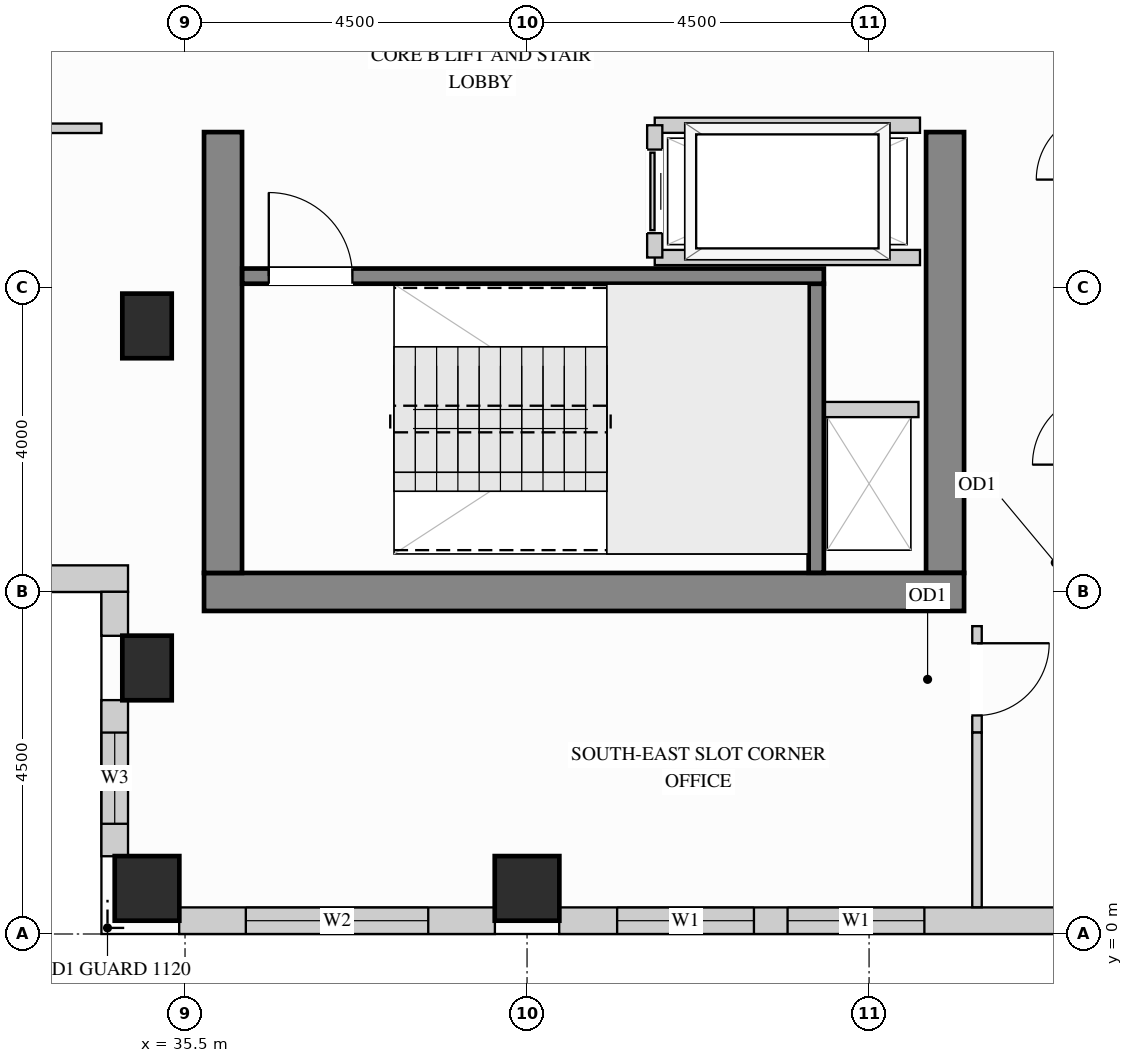
"""IFC4 building model, lengths in metres.
Left out: names, types, materials, properties, quantities, classifications, styles, units other than length and angle.
Written with IfcOpenShell. Run it as: python <this file> out.ifc"""

import sys

from ifc_helpers import new_model, si_unit, direction, frame, frame_2d, origin, origin_2d, place, context, subcontext, project, spatial, rectangle, extrude, source, transform, mapped, element, fill, save


model = new_model("IFC4")
c1 = context("Model", 3, precision=1e-05, world=origin(), true_north=direction((0.0, 1.0)))
c2 = subcontext(c1, "Body", "Model", "MODEL_VIEW")
j1 = project(units=[si_unit("LENGTHUNIT", "METRE"), si_unit("PLANEANGLEUNIT", "RADIAN")], contexts=[c1])
p1 = place(None, origin())
s1 = spatial("IfcSite", under=j1, at=p1, CompositionType="ELEMENT")
p2 = place(p1, origin())
s2 = spatial("IfcBuilding", under=s1, at=p2, CompositionType="ELEMENT")
p3 = place(p2, frame((0.0, 0.0, 216.0)))
s3 = spatial("IfcBuildingStorey", under=s2, at=p3, CompositionType="ELEMENT", Elevation=216.0)
m1 = source(origin(), c2, "Body", "SweptSolid", [
    extrude(rectangle(XDim=0.65, YDim=0.85, at=origin_2d()), origin(), (0.0, 0.0, 1.0), 3.4),
])
for number, where, z_axis, x_axis in (
    (1, (35.0, 3.5, 0.0), (0.0, 0.0, 1.0), (1.0, 0.0, 0.0)),
    (2, (35.0, 8.0, 0.0), (0.0, 0.0, 1.0), (1.0, 0.0, 0.0)),
):
    element("IfcColumn", number, at=place(p3, frame(where, z_axis=z_axis, x_axis=x_axis)), inside=s3, PredefinedType="COLUMN", context=c2, shape_type="MappedRepresentation", body=[
        mapped(m1, transform((0.0, 0.0, 0.0), x_axis=(1.0, 0.0, 0.0), y_axis=(0.0, 1.0, 0.0), z_axis=(0.0, 0.0, 1.0))),
    ])
m2 = source(origin(), c2, "Body", "SweptSolid", [
    extrude(rectangle(XDim=0.85, YDim=0.85, at=origin_2d()), origin(), (0.0, 0.0, 1.0), 3.4),
])
for number, where, z_axis, x_axis in (
    (3, (35.0, 0.6, 0.0), (0.0, 0.0, 1.0), (1.0, 0.0, 0.0)),
    (4, (40.0, 0.6, 0.0), (0.0, 0.0, 1.0), (1.0, 0.0, 0.0)),
):
    element("IfcColumn", number, at=place(p3, frame(where, z_axis=z_axis, x_axis=x_axis)), inside=s3, PredefinedType="COLUMN", context=c2, shape_type="MappedRepresentation", body=[
        mapped(m2, transform((0.0, 0.0, 0.0), x_axis=(1.0, 0.0, 0.0), y_axis=(0.0, 1.0, 0.0), z_axis=(0.0, 0.0, 1.0))),
    ])
m3 = source(origin(), c2, "Body", "SweptSolid", [
    extrude(rectangle(XDim=5.8, YDim=0.5, at=frame_2d((2.9, 0.0))), origin(), (0.0, 0.0, 1.0), 3.4),
])
p4 = place(p3, frame((45.5, 4.75, 0.0), z_axis=(0.0, 0.0, 1.0), x_axis=(0.0, 1.0, 0.0)))
e5 = element("IfcWall", 5, at=p4, inside=s3, PredefinedType="SHEAR", context=c2, shape_type="MappedRepresentation", body=[
    mapped(m3, transform((0.0, 0.0, 0.0), x_axis=(1.0, 0.0, 0.0), y_axis=(0.0, 1.0, 0.0), z_axis=(0.0, 0.0, 1.0))),
])
m4 = source(origin(), c2, "Body", "SweptSolid", [
    extrude(rectangle(XDim=10.0, YDim=0.5, at=frame_2d((5.0, 0.0))), origin(), (0.0, 0.0, 1.0), 3.4),
])
p5 = place(p3, frame((35.75, 4.5, 0.0), z_axis=(0.0, 0.0, 1.0), x_axis=(1.0, 0.0, 0.0)))
e6 = element("IfcWall", 6, at=p5, inside=s3, PredefinedType="SHEAR", context=c2, shape_type="MappedRepresentation", body=[
    mapped(m4, transform((0.0, 0.0, 0.0), x_axis=(1.0, 0.0, 0.0), y_axis=(0.0, 1.0, 0.0), z_axis=(0.0, 0.0, 1.0))),
])
p6 = place(p3, frame((36.0, 4.75, 0.0), z_axis=(0.0, 0.0, 1.0), x_axis=(0.0, 1.0, 0.0)))
e7 = element("IfcWall", 7, at=p6, inside=s3, PredefinedType="SHEAR", context=c2, shape_type="MappedRepresentation", body=[
    mapped(m3, transform((0.0, 0.0, 0.0), x_axis=(1.0, 0.0, 0.0), y_axis=(0.0, 1.0, 0.0), z_axis=(0.0, 0.0, 1.0))),
])
p7 = place(p3, frame((19.15, 4.675, 0.0), z_axis=(0.0, 0.0, 1.0), x_axis=(1.0, 0.0, 0.0)))
e8 = element("IfcWall", 8, at=p7, inside=s3, PredefinedType="SOLIDWALL", context=c2, shape_type="SweptSolid", body=[
    extrude(rectangle(XDim=15.6, YDim=0.35, at=frame_2d((7.8, 0.0))), origin(), (0.0, 0.0, 1.0), 3.385),
])
p8 = place(p7, frame((1.73, 0.0, 0.78)))
e9 = element("IfcOpeningElement", 9, at=p8, cuts=e8, PredefinedType="OPENING", context=c2, shape_type="SweptSolid", body=[
    extrude(rectangle(XDim=1.5, YDim=2.0, at=frame_2d((0.75, 1.0))), frame((0.0, 0.185, 0.0), z_axis=(0.0, -1.0, 0.0), x_axis=(1.0, 0.0, 0.0)), (0.0, 0.0, 1.0), 0.37),
])
p9 = place(p7, frame((4.64, 0.0, 0.78)))
e10 = element("IfcOpeningElement", 10, at=p9, cuts=e8, PredefinedType="OPENING", context=c2, shape_type="SweptSolid", body=[
    extrude(rectangle(XDim=1.5, YDim=2.0, at=frame_2d((0.75, 1.0))), frame((0.0, 0.185, 0.0), z_axis=(0.0, -1.0, 0.0), x_axis=(1.0, 0.0, 0.0)), (0.0, 0.0, 1.0), 0.37),
])
p10 = place(p7, frame((9.46, 0.0, 0.78)))
e11 = element("IfcOpeningElement", 11, at=p10, cuts=e8, PredefinedType="OPENING", context=c2, shape_type="SweptSolid", body=[
    extrude(rectangle(XDim=1.5, YDim=2.0, at=frame_2d((0.75, 1.0))), frame((0.0, 0.185, 0.0), z_axis=(0.0, -1.0, 0.0), x_axis=(1.0, 0.0, 0.0)), (0.0, 0.0, 1.0), 0.37),
])
p11 = place(p7, frame((12.37, 0.0, 0.78)))
e12 = element("IfcOpeningElement", 12, at=p11, cuts=e8, PredefinedType="OPENING", context=c2, shape_type="SweptSolid", body=[
    extrude(rectangle(XDim=1.5, YDim=2.0, at=frame_2d((0.75, 1.0))), frame((0.0, 0.185, 0.0), z_axis=(0.0, -1.0, 0.0), x_axis=(1.0, 0.0, 0.0)), (0.0, 0.0, 1.0), 0.37),
])
m5 = source(origin(), c2, "Body", "SweptSolid", [
    extrude(rectangle(XDim=0.579, YDim=0.35, at=frame_2d((0.29, 0.0))), origin(), (0.0, 0.0, 1.0), 3.385),
])
p12 = place(p3, frame((34.575, 4.502, 0.0), z_axis=(0.0, 0.0, 1.0), x_axis=(0.0, -1.0, 0.0)))
e13 = element("IfcWall", 13, at=p12, inside=s3, PredefinedType="SOLIDWALL", context=c2, shape_type="MappedRepresentation", body=[
    mapped(m5, transform((0.0, 0.0, 0.0), x_axis=(1.0, 0.0, 0.0), y_axis=(0.0, 1.0, 0.0), z_axis=(0.0, 0.0, 1.0))),
])
p13 = place(p3, frame((34.575, 3.077, 0.0), z_axis=(0.0, 0.0, 1.0), x_axis=(0.0, -1.0, 0.0)))
e14 = element("IfcWall", 14, at=p13, inside=s3, PredefinedType="SOLIDWALL", context=c2, shape_type="SweptSolid", body=[
    extrude(rectangle(XDim=2.054, YDim=0.35, at=frame_2d((1.027, 0.0))), origin(), (0.0, 0.0, 1.0), 3.385),
])
p14 = place(p13, frame((0.427, 0.0, 0.78)))
e15 = element("IfcOpeningElement", 15, at=p14, cuts=e14, PredefinedType="OPENING", context=c2, shape_type="SweptSolid", body=[
    extrude(rectangle(XDim=1.2, YDim=2.0, at=frame_2d((0.6, 1.0))), frame((0.0, 0.185, 0.0), z_axis=(0.0, -1.0, 0.0), x_axis=(1.0, 0.0, 0.0)), (0.0, 0.0, 1.0), 0.37),
])
p15 = place(p3, frame((35.423, 0.175, 0.0), z_axis=(0.0, 0.0, 1.0), x_axis=(1.0, 0.0, 0.0)))
e16 = element("IfcWall", 16, at=p15, inside=s3, PredefinedType="SOLIDWALL", context=c2, shape_type="SweptSolid", body=[
    extrude(rectangle(XDim=4.154, YDim=0.35, at=frame_2d((2.077, 0.0))), origin(), (0.0, 0.0, 1.0), 3.385),
])
p16 = place(p15, frame((0.877, 0.0, 0.78)))
e17 = element("IfcOpeningElement", 17, at=p16, cuts=e16, PredefinedType="OPENING", context=c2, shape_type="SweptSolid", body=[
    extrude(rectangle(XDim=2.4, YDim=2.1, at=frame_2d((1.2, 1.05))), frame((0.0, 0.185, 0.0), z_axis=(0.0, -1.0, 0.0), x_axis=(1.0, 0.0, 0.0)), (0.0, 0.0, 1.0), 0.37),
])
p17 = place(p3, frame((40.423, 0.175, 0.0), z_axis=(0.0, 0.0, 1.0), x_axis=(1.0, 0.0, 0.0)))
e18 = element("IfcWall", 18, at=p17, inside=s3, PredefinedType="SOLIDWALL", context=c2, shape_type="SweptSolid", body=[
    extrude(rectangle(XDim=7.077, YDim=0.35, at=frame_2d((3.539, 0.0))), origin(), (0.0, 0.0, 1.0), 3.385),
])
p18 = place(p17, frame((0.762, 0.0, 0.78)))
e19 = element("IfcOpeningElement", 19, at=p18, cuts=e18, PredefinedType="OPENING", context=c2, shape_type="SweptSolid", body=[
    extrude(rectangle(XDim=1.8, YDim=2.1, at=frame_2d((0.9, 1.05))), frame((0.0, 0.185, 0.0), z_axis=(0.0, -1.0, 0.0), x_axis=(1.0, 0.0, 0.0)), (0.0, 0.0, 1.0), 0.37),
])
p19 = place(p17, frame((3.005, 0.0, 0.78)))
e20 = element("IfcOpeningElement", 20, at=p19, cuts=e18, PredefinedType="OPENING", context=c2, shape_type="SweptSolid", body=[
    extrude(rectangle(XDim=1.8, YDim=2.1, at=frame_2d((0.9, 1.05))), frame((0.0, 0.185, 0.0), z_axis=(0.0, -1.0, 0.0), x_axis=(1.0, 0.0, 0.0)), (0.0, 0.0, 1.0), 0.37),
])
p20 = place(p3, frame((45.92, 2.65, 0.0), z_axis=(0.0, 0.0, 1.0), x_axis=(0.0, 1.0, 0.0)))
e21 = element("IfcWall", 21, at=p20, inside=s3, PredefinedType="PARTITIONING", context=c2, shape_type="SweptSolid", body=[
    extrude(rectangle(XDim=1.4, YDim=0.125, at=frame_2d((0.7, 0.0))), origin(), (0.0, 0.0, 1.0), 3.385),
])
p21 = place(p20, frame((0.225, 0.0, 0.0)))
e22 = element("IfcOpeningElement", 22, at=p21, cuts=e21, PredefinedType="OPENING", context=c2, shape_type="SweptSolid", body=[
    extrude(rectangle(XDim=0.95, YDim=2.15, at=frame_2d((0.475, 1.075))), frame((0.0, 0.073, 0.0), z_axis=(0.0, -1.0, 0.0), x_axis=(1.0, 0.0, 0.0)), (0.0, 0.0, 1.0), 0.145),
])
m6 = source(origin(), c2, "Body", "SweptSolid", [
    extrude(rectangle(XDim=2.298, YDim=0.125, at=frame_2d((1.149, 0.0))), origin(), (0.0, 0.0, 1.0), 3.385),
])
p22 = place(p3, frame((45.92, 0.352, 0.0), z_axis=(0.0, 0.0, 1.0), x_axis=(0.0, 1.0, 0.0)))
e23 = element("IfcWall", 23, at=p22, inside=s3, PredefinedType="PARTITIONING", context=c2, shape_type="MappedRepresentation", body=[
    mapped(m6, transform((0.0, 0.0, 0.0), x_axis=(1.0, 0.0, 0.0), y_axis=(0.0, 1.0, 0.0), z_axis=(0.0, 0.0, 1.0))),
])
p23 = place(p3, frame((26.95, 10.6, 0.0), z_axis=(0.0, 0.0, 1.0), x_axis=(1.0, 0.0, 0.0)))
e24 = element("IfcWall", 24, at=p23, inside=s3, PredefinedType="PARTITIONING", context=c2, shape_type="SweptSolid", body=[
    extrude(rectangle(XDim=7.45, YDim=0.125, at=frame_2d((3.725, 0.0))), origin(), (0.0, 0.0, 1.0), 3.385),
])
p24 = place(p23, frame((4.478, 0.0, 0.0)))
e25 = element("IfcOpeningElement", 25, at=p24, cuts=e24, PredefinedType="OPENING", context=c2, shape_type="SweptSolid", body=[
    extrude(rectangle(XDim=0.95, YDim=2.15, at=frame_2d((0.475, 1.075))), frame((0.0, 0.073, 0.0), z_axis=(0.0, -1.0, 0.0), x_axis=(1.0, 0.0, 0.0)), (0.0, 0.0, 1.0), 0.145),
])
m7 = source(origin(), c2, "Body", "SweptSolid", [
    extrude(rectangle(XDim=1.3, YDim=0.2, at=frame_2d((0.65, 0.0))), origin(), (0.0, 0.0, 1.0), 3.385),
])
p25 = place(p3, frame((43.85, 6.9, 0.0), z_axis=(0.0, 0.0, 1.0), x_axis=(1.0, 0.0, 0.0)))
e26 = element("IfcWall", 26, at=p25, inside=s3, PredefinedType="PARTITIONING", context=c2, shape_type="MappedRepresentation", body=[
    mapped(m7, transform((0.0, 0.0, 0.0), x_axis=(1.0, 0.0, 0.0), y_axis=(0.0, 1.0, 0.0), z_axis=(0.0, 0.0, 1.0))),
])
m8 = source(origin(), c2, "Body", "SweptSolid", [
    extrude(rectangle(XDim=3.49, YDim=0.2, at=frame_2d((1.745, 0.0))), origin(), (0.0, 0.0, 1.0), 3.385),
])
for number, where, z_axis, x_axis in (
    (27, (41.68, 10.64, 0.0), (0.0, 0.0, 1.0), (1.0, 0.0, 0.0)),
    (28, (41.68, 8.9, 0.0), (0.0, 0.0, 1.0), (1.0, 0.0, 0.0)),
):
    element("IfcWall", number, at=place(p3, frame(where, z_axis=z_axis, x_axis=x_axis)), inside=s3, PredefinedType="PARTITIONING", context=c2, shape_type="MappedRepresentation", body=[
        mapped(m8, transform((0.0, 0.0, 0.0), x_axis=(1.0, 0.0, 0.0), y_axis=(0.0, 1.0, 0.0), z_axis=(0.0, 0.0, 1.0))),
    ])
p26 = place(p3, frame((41.68, 8.9, 0.0), z_axis=(0.0, 0.0, 1.0), x_axis=(0.0, 1.0, 0.0)))
e29 = element("IfcWall", 29, at=p26, inside=s3, PredefinedType="PARTITIONING", context=c2, shape_type="SweptSolid", body=[
    extrude(rectangle(XDim=1.74, YDim=0.2, at=frame_2d((0.87, 0.0))), origin(), (0.0, 0.0, 1.0), 3.385),
])
p27 = place(p26, frame((0.32, 0.0, 0.0)))
e30 = element("IfcOpeningElement", 30, at=p27, cuts=e29, PredefinedType="OPENING", context=c2, shape_type="SweptSolid", body=[
    extrude(rectangle(XDim=1.1, YDim=2.2, at=frame_2d((0.55, 1.1))), frame((0.0, 0.11, 0.0), z_axis=(0.0, -1.0, 0.0), x_axis=(1.0, 0.0, 0.0)), (0.0, 0.0, 1.0), 0.22),
])
m9 = source(origin(), c2, "Body", "SweptSolid", [
    extrude(rectangle(XDim=3.803, YDim=0.2, at=frame_2d((1.901, 0.0))), origin(), (0.0, 0.0, 1.0), 3.4),
])
p28 = place(p3, frame((43.805, 4.752, 0.0), z_axis=(0.0, 0.0, 1.0), x_axis=(0.0, 1.0, 0.0)))
e31 = element("IfcWall", 31, at=p28, inside=s3, PredefinedType="SHEAR", context=c2, shape_type="MappedRepresentation", body=[
    mapped(m9, transform((0.0, 0.0, 0.0), x_axis=(1.0, 0.0, 0.0), y_axis=(0.0, 1.0, 0.0), z_axis=(0.0, 0.0, 1.0))),
])
p29 = place(p3, frame((36.252, 8.655, 0.0), z_axis=(0.0, 0.0, 1.0), x_axis=(1.0, 0.0, 0.0)))
e32 = element("IfcWall", 32, at=p29, inside=s3, PredefinedType="SHEAR", context=c2, shape_type="SweptSolid", body=[
    extrude(rectangle(XDim=7.653, YDim=0.2, at=frame_2d((3.827, 0.0))), origin(), (0.0, 0.0, 1.0), 3.4),
])
p30 = place(p29, frame((0.35, 0.0, 0.0)))
e33 = element("IfcOpeningElement", 33, at=p30, cuts=e32, PredefinedType="OPENING", context=c2, shape_type="SweptSolid", body=[
    extrude(rectangle(XDim=1.1, YDim=2.15, at=frame_2d((0.55, 1.075))), frame((0.0, 0.11, 0.0), z_axis=(0.0, -1.0, 0.0), x_axis=(1.0, 0.0, 0.0)), (0.0, 0.0, 1.0), 0.22),
])
m10 = source(origin(), c2, "Body", "SweptSolid", [
    extrude(rectangle(XDim=1.1, YDim=2.2, at=frame_2d((0.55, 1.1))), frame((0.0, 0.025, 0.0), z_axis=(0.0, -1.0, 0.0), x_axis=(1.0, 0.0, 0.0)), (0.0, 0.0, 1.0), 0.05),
])
p31 = place(p27, origin())
e34 = element("IfcDoor", 34, at=p31, inside=s3, OperationType="SLIDING_TO_LEFT", PredefinedType="DOOR", context=c2, shape_type="MappedRepresentation", body=[
    mapped(m10, transform((0.0, 0.0, 0.0), x_axis=(1.0, 0.0, 0.0), y_axis=(0.0, 1.0, 0.0), z_axis=(0.0, 0.0, 1.0))),
])
fill(e30, e34)
m11 = source(origin(), c2, "Body", "SweptSolid", [
    extrude(rectangle(XDim=0.95, YDim=2.15, at=frame_2d((0.475, 1.075))), frame((0.0, 0.025, 0.0), z_axis=(0.0, -1.0, 0.0), x_axis=(1.0, 0.0, 0.0)), (0.0, 0.0, 1.0), 0.05),
])
p32 = place(p21, origin())
e35 = element("IfcDoor", 35, at=p32, inside=s3, OperationType="SINGLE_SWING_RIGHT", PredefinedType="DOOR", context=c2, shape_type="MappedRepresentation", body=[
    mapped(m11, transform((0.0, 0.0, 0.0), x_axis=(1.0, 0.0, 0.0), y_axis=(0.0, 1.0, 0.0), z_axis=(0.0, 0.0, 1.0))),
])
fill(e22, e35)
m12 = source(origin(), c2, "Body", "SweptSolid", [
    extrude(rectangle(XDim=1.1, YDim=2.15, at=frame_2d((0.55, 1.075))), frame((0.0, 0.025, 0.0), z_axis=(0.0, -1.0, 0.0), x_axis=(1.0, 0.0, 0.0)), (0.0, 0.0, 1.0), 0.05),
])
p33 = place(p30, origin())
e36 = element("IfcDoor", 36, at=p33, inside=s3, OperationType="SINGLE_SWING_LEFT", PredefinedType="DOOR", context=c2, shape_type="MappedRepresentation", body=[
    mapped(m12, transform((0.0, 0.0, 0.0), x_axis=(1.0, 0.0, 0.0), y_axis=(0.0, 1.0, 0.0), z_axis=(0.0, 0.0, 1.0))),
])
fill(e33, e36)
m13 = source(origin(), c2, "Body", "SweptSolid", [
    extrude(rectangle(XDim=1.8, YDim=2.1, at=frame_2d((0.9, 1.05))), frame((0.0, 0.03, 0.0), z_axis=(0.0, -1.0, 0.0), x_axis=(1.0, 0.0, 0.0)), (0.0, 0.0, 1.0), 0.06),
])
p34 = place(p18, origin())
e37 = element("IfcWindow", 37, at=p34, inside=s3, PartitioningType="SINGLE_PANEL", PredefinedType="WINDOW", context=c2, shape_type="MappedRepresentation", body=[
    mapped(m13, transform((0.0, 0.0, 0.0), x_axis=(1.0, 0.0, 0.0), y_axis=(0.0, 1.0, 0.0), z_axis=(0.0, 0.0, 1.0))),
])
fill(e19, e37)
p35 = place(p19, origin())
e38 = element("IfcWindow", 38, at=p35, inside=s3, PartitioningType="SINGLE_PANEL", PredefinedType="WINDOW", context=c2, shape_type="MappedRepresentation", body=[
    mapped(m13, transform((0.0, 0.0, 0.0), x_axis=(1.0, 0.0, 0.0), y_axis=(0.0, 1.0, 0.0), z_axis=(0.0, 0.0, 1.0))),
])
fill(e20, e38)
m14 = source(origin(), c2, "Body", "SweptSolid", [
    extrude(rectangle(XDim=2.4, YDim=2.1, at=frame_2d((1.2, 1.05))), frame((0.0, 0.03, 0.0), z_axis=(0.0, -1.0, 0.0), x_axis=(1.0, 0.0, 0.0)), (0.0, 0.0, 1.0), 0.06),
])
p36 = place(p16, origin())
e39 = element("IfcWindow", 39, at=p36, inside=s3, PartitioningType="SINGLE_PANEL", PredefinedType="WINDOW", context=c2, shape_type="MappedRepresentation", body=[
    mapped(m14, transform((0.0, 0.0, 0.0), x_axis=(1.0, 0.0, 0.0), y_axis=(0.0, 1.0, 0.0), z_axis=(0.0, 0.0, 1.0))),
])
fill(e17, e39)
m15 = source(origin(), c2, "Body", "SweptSolid", [
    extrude(rectangle(XDim=1.2, YDim=2.0, at=frame_2d((0.6, 1.0))), frame((0.0, 0.03, 0.0), z_axis=(0.0, -1.0, 0.0), x_axis=(1.0, 0.0, 0.0)), (0.0, 0.0, 1.0), 0.06),
])
p37 = place(p14, origin())
e40 = element("IfcWindow", 40, at=p37, inside=s3, PartitioningType="SINGLE_PANEL", PredefinedType="WINDOW", context=c2, shape_type="MappedRepresentation", body=[
    mapped(m15, transform((0.0, 0.0, 0.0), x_axis=(1.0, 0.0, 0.0), y_axis=(0.0, 1.0, 0.0), z_axis=(0.0, 0.0, 1.0))),
])
fill(e15, e40)
save(model, sys.argv[1])
